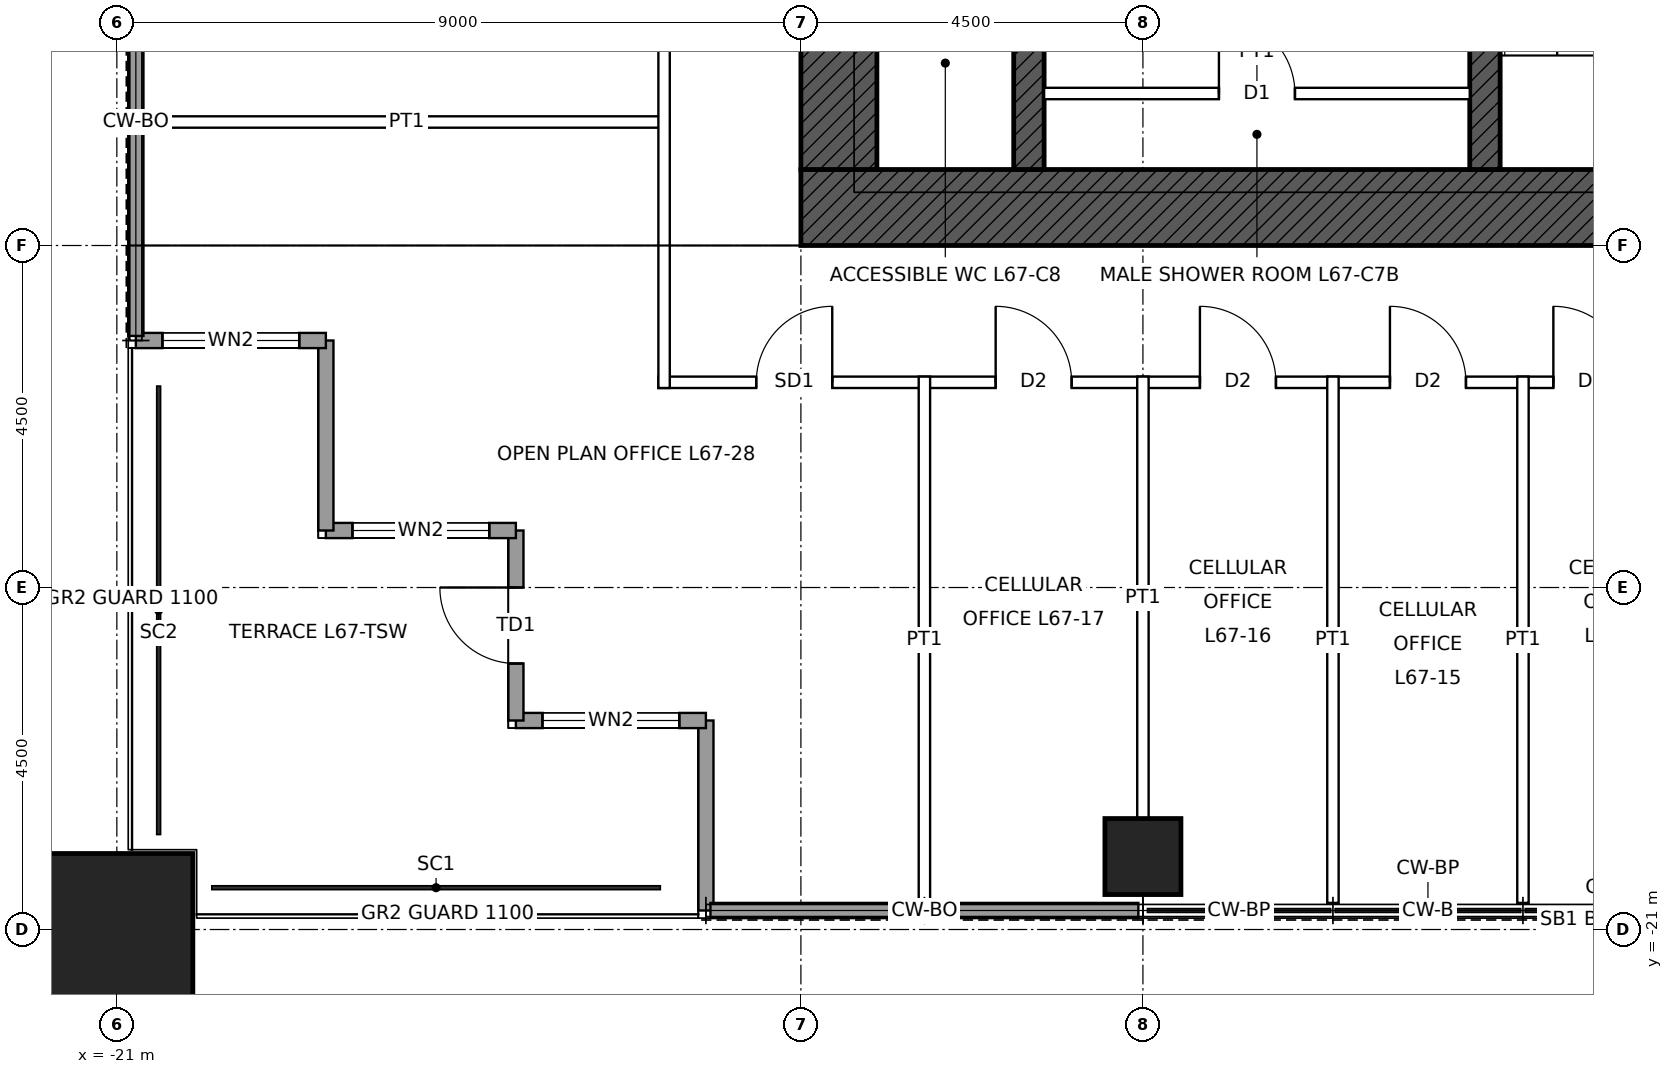
"""IFC4 building model, lengths in metres.
Left out: names, types, materials, properties, quantities, classifications, styles, units other than length and angle.
Written with IfcOpenShell. Run it as: python <this file> out.ifc"""

import sys

from ifc_helpers import new_model, si_unit, direction, frame, frame_2d, origin, origin_2d, place, context, subcontext, project, spatial, rectangle, hollow_rectangle, extrude, element, fill, save


model = new_model("IFC4")
c1 = context("Model", 3, precision=1e-05, world=origin(), true_north=direction((0.0, 1.0)))
c2 = subcontext(c1, "Body", "Model", "MODEL_VIEW")
j1 = project(units=[si_unit("LENGTHUNIT", "METRE"), si_unit("PLANEANGLEUNIT", "RADIAN")], contexts=[c1])
p1 = place(None, origin())
s1 = spatial("IfcSite", under=j1, at=p1, CompositionType="ELEMENT")
p2 = place(p1, origin())
s2 = spatial("IfcBuilding", under=s1, at=p2, CompositionType="ELEMENT")
p3 = place(p2, frame((0.0, 0.0, 303.9)))
s3 = spatial("IfcBuildingStorey", under=s2, at=p3, CompositionType="ELEMENT", Elevation=303.9)
p4 = place(p3, frame((-21.0, -21.0, 0.0), z_axis=(0.0, 0.0, 1.0), x_axis=(1.0, 0.0, 0.0)))
e1 = element("IfcColumn", 1, at=p4, inside=s3, PredefinedType="COLUMN", context=c2, shape_type="SweptSolid", body=[
    extrude(hollow_rectangle(XDim=2.0, YDim=2.0, WallThickness=0.095, at=origin_2d()), origin(), (0.0, 0.0, 1.0), 4.0),
])
p5 = place(p3, frame((-7.5, -20.04, 0.0), z_axis=(0.0, 0.0, 1.0), x_axis=(1.0, 0.0, 0.0)))
e2 = element("IfcColumn", 2, at=p5, inside=s3, PredefinedType="COLUMN", context=c2, shape_type="SweptSolid", body=[
    extrude(hollow_rectangle(XDim=1.0, YDim=1.0, WallThickness=0.075, at=origin_2d()), origin(), (0.0, 0.0, 1.0), 4.0),
])
p6 = place(p3, frame((12.0, -11.5, 0.0), z_axis=(0.0, 0.0, 1.0), x_axis=(-1.0, 0.0, 0.0)))
e3 = element("IfcWall", 3, at=p6, inside=s3, PredefinedType="SHEAR", context=c2, shape_type="SweptSolid", body=[
    extrude(rectangle(XDim=24.0, YDim=1.0, at=frame_2d((12.0, 0.0))), origin(), (0.0, 0.0, 1.0), 4.0),
])
p7 = place(p6, frame((11.5, 0.0, 0.0)))
e4 = element("IfcOpeningElement", 4, at=p7, cuts=e3, PredefinedType="OPENING", context=c2, shape_type="SweptSolid", body=[
    extrude(rectangle(XDim=1.0, YDim=2.1, at=frame_2d((0.5, 1.05))), frame((0.0, 0.51, 0.0), z_axis=(0.0, -1.0, 0.0), x_axis=(1.0, 0.0, 0.0)), (0.0, 0.0, 1.0), 1.02),
])
p8 = place(p6, frame((1.0, 0.0, 0.0)))
e5 = element("IfcOpeningElement", 5, at=p8, cuts=e3, PredefinedType="OPENING", context=c2, shape_type="SweptSolid", body=[
    extrude(rectangle(XDim=1.0, YDim=2.4, at=frame_2d((0.5, 1.2))), frame((0.0, 0.51, 0.0), z_axis=(0.0, -1.0, 0.0), x_axis=(1.0, 0.0, 0.0)), (0.0, 0.0, 1.0), 1.02),
])
p9 = place(p3, frame((-11.5, -11.0, 0.0), z_axis=(0.0, 0.0, 1.0), x_axis=(0.0, 1.0, 0.0)))
e6 = element("IfcWall", 6, at=p9, inside=s3, PredefinedType="SHEAR", context=c2, shape_type="SweptSolid", body=[
    extrude(rectangle(XDim=22.0, YDim=1.0, at=frame_2d((11.0, 0.0))), origin(), (0.0, 0.0, 1.0), 4.0),
])
p10 = place(p9, frame((10.5, 0.0, 0.0)))
e7 = element("IfcOpeningElement", 7, at=p10, cuts=e6, PredefinedType="OPENING", context=c2, shape_type="SweptSolid", body=[
    extrude(rectangle(XDim=1.0, YDim=2.4, at=frame_2d((0.5, 1.2))), frame((0.0, 0.51, 0.0), z_axis=(0.0, -1.0, 0.0), x_axis=(1.0, 0.0, 0.0)), (0.0, 0.0, 1.0), 1.02),
])
p11 = place(p3, frame((-9.0, -11.0, 0.0), z_axis=(0.0, 0.0, 1.0), x_axis=(0.0, 1.0, 0.0)))
e8 = element("IfcWall", 8, at=p11, inside=s3, PredefinedType="SHEAR", context=c2, shape_type="SweptSolid", body=[
    extrude(rectangle(XDim=6.5, YDim=0.4, at=frame_2d((3.25, 0.0))), origin(), (0.0, 0.0, 1.0), 4.0),
])
p12 = place(p11, frame((4.25, 0.0, 0.0)))
e9 = element("IfcOpeningElement", 9, at=p12, cuts=e8, PredefinedType="OPENING", context=c2, shape_type="SweptSolid", body=[
    extrude(rectangle(XDim=1.0, YDim=2.1, at=frame_2d((0.5, 1.05))), frame((0.0, 0.21, 0.0), z_axis=(0.0, -1.0, 0.0), x_axis=(1.0, 0.0, 0.0)), (0.0, 0.0, 1.0), 0.42),
])
p13 = place(p3, frame((-3.0, -11.0, 0.0), z_axis=(0.0, 0.0, 1.0), x_axis=(0.0, 1.0, 0.0)))
e10 = element("IfcWall", 10, at=p13, inside=s3, PredefinedType="SHEAR", context=c2, shape_type="SweptSolid", body=[
    extrude(rectangle(XDim=6.5, YDim=0.4, at=frame_2d((3.25, 0.0))), origin(), (0.0, 0.0, 1.0), 4.0),
])
p14 = place(p3, frame((-13.25, -20.75, 0.0), z_axis=(0.0, 0.0, 1.0), x_axis=(0.0, 1.0, 0.0)))
e11 = element("IfcWall", 11, at=p14, inside=s3, PredefinedType="SOLIDWALL", context=c2, shape_type="SweptSolid", body=[
    extrude(rectangle(XDim=2.5, YDim=0.2, at=frame_2d((1.25, 0.0))), origin(), (0.0, 0.0, 1.0), 3.85),
])
p15 = place(p3, frame((-13.25, -18.25, 0.0), z_axis=(0.0, 0.0, 1.0), x_axis=(-1.0, 0.0, 0.0)))
e12 = element("IfcWall", 12, at=p15, inside=s3, PredefinedType="SOLIDWALL", context=c2, shape_type="SweptSolid", body=[
    extrude(rectangle(XDim=2.5, YDim=0.2, at=frame_2d((1.25, 0.0))), origin(), (0.0, 0.0, 1.0), 3.85),
])
p16 = place(p15, frame((0.35, 0.0, 0.3)))
e13 = element("IfcOpeningElement", 13, at=p16, cuts=e12, PredefinedType="OPENING", context=c2, shape_type="SweptSolid", body=[
    extrude(rectangle(XDim=1.8, YDim=2.4, at=frame_2d((0.9, 1.2))), frame((0.0, 0.11, 0.0), z_axis=(0.0, -1.0, 0.0), x_axis=(1.0, 0.0, 0.0)), (0.0, 0.0, 1.0), 0.22),
])
p17 = place(p3, frame((-15.75, -18.25, 0.0), z_axis=(0.0, 0.0, 1.0), x_axis=(0.0, 1.0, 0.0)))
e14 = element("IfcWall", 14, at=p17, inside=s3, PredefinedType="SOLIDWALL", context=c2, shape_type="SweptSolid", body=[
    extrude(rectangle(XDim=2.5, YDim=0.2, at=frame_2d((1.25, 0.0))), origin(), (0.0, 0.0, 1.0), 3.317),
])
p18 = place(p17, frame((0.75, 0.0, 0.0)))
e15 = element("IfcOpeningElement", 15, at=p18, cuts=e14, PredefinedType="OPENING", context=c2, shape_type="SweptSolid", body=[
    extrude(rectangle(XDim=1.0, YDim=2.4, at=frame_2d((0.5, 1.2))), frame((0.0, 0.11, 0.0), z_axis=(0.0, -1.0, 0.0), x_axis=(1.0, 0.0, 0.0)), (0.0, 0.0, 1.0), 0.22),
])
p19 = place(p3, frame((-15.75, -15.75, 0.0), z_axis=(0.0, 0.0, 1.0), x_axis=(-1.0, 0.0, 0.0)))
e16 = element("IfcWall", 16, at=p19, inside=s3, PredefinedType="SOLIDWALL", context=c2, shape_type="SweptSolid", body=[
    extrude(rectangle(XDim=2.5, YDim=0.2, at=frame_2d((1.25, 0.0))), origin(), (0.0, 0.0, 1.0), 3.85),
])
p20 = place(p19, frame((0.35, 0.0, 0.3)))
e17 = element("IfcOpeningElement", 17, at=p20, cuts=e16, PredefinedType="OPENING", context=c2, shape_type="SweptSolid", body=[
    extrude(rectangle(XDim=1.8, YDim=2.4, at=frame_2d((0.9, 1.2))), frame((0.0, 0.11, 0.0), z_axis=(0.0, -1.0, 0.0), x_axis=(1.0, 0.0, 0.0)), (0.0, 0.0, 1.0), 0.22),
])
p21 = place(p3, frame((-18.25, -15.75, 0.0), z_axis=(0.0, 0.0, 1.0), x_axis=(0.0, 1.0, 0.0)))
e18 = element("IfcWall", 18, at=p21, inside=s3, PredefinedType="SOLIDWALL", context=c2, shape_type="SweptSolid", body=[
    extrude(rectangle(XDim=2.5, YDim=0.2, at=frame_2d((1.25, 0.0))), origin(), (0.0, 0.0, 1.0), 3.85),
])
p22 = place(p3, frame((-18.25, -13.25, 0.0), z_axis=(0.0, 0.0, 1.0), x_axis=(-1.0, 0.0, 0.0)))
e19 = element("IfcWall", 19, at=p22, inside=s3, PredefinedType="SOLIDWALL", context=c2, shape_type="SweptSolid", body=[
    extrude(rectangle(XDim=2.5, YDim=0.2, at=frame_2d((1.25, 0.0))), origin(), (0.0, 0.0, 1.0), 3.85),
])
p23 = place(p22, frame((0.35, 0.0, 0.3)))
e20 = element("IfcOpeningElement", 20, at=p23, cuts=e19, PredefinedType="OPENING", context=c2, shape_type="SweptSolid", body=[
    extrude(rectangle(XDim=1.8, YDim=2.4, at=frame_2d((0.9, 1.2))), frame((0.0, 0.11, 0.0), z_axis=(0.0, -1.0, 0.0), x_axis=(1.0, 0.0, 0.0)), (0.0, 0.0, 1.0), 0.22),
])
for number, where, z_axis, x_axis in (
    (21, (-7.56, -20.75, 0.0), (0.0, 0.0, 1.0), (-1.0, 0.0, 0.0)),
    (22, (-10.405, -20.75, 0.0), (0.0, 0.0, 1.0), (-1.0, 0.0, 0.0)),
    (23, (-20.75, -13.19, 0.0), (0.0, 0.0, 1.0), (0.0, 1.0, 0.0)),
    (24, (-20.75, -10.345, 0.0), (0.0, 0.0, 1.0), (0.0, 1.0, 0.0)),
):
    element("IfcWall", number, at=place(p3, frame(where, z_axis=z_axis, x_axis=x_axis)), inside=s3, PredefinedType="SOLIDWALL", context=c2, shape_type="SweptSolid", body=[
        extrude(rectangle(XDim=2.785, YDim=0.2, at=frame_2d((1.393, 0.0))), origin(), (0.0, 0.0, 1.0), 3.85),
    ])
p24 = place(p3, frame((-13.875, -13.8, 0.0), z_axis=(0.0, 0.0, 1.0), x_axis=(1.0, 0.0, 0.0)))
e25 = element("IfcWall", 25, at=p24, inside=s3, PredefinedType="PARTITIONING", context=c2, shape_type="SweptSolid", body=[
    extrude(rectangle(XDim=27.75, YDim=0.15, at=frame_2d((13.875, 0.0))), origin(), (0.0, 0.0, 1.0), 3.85),
])
p25 = place(p24, frame((21.775, 0.0, 0.0)))
e26 = element("IfcOpeningElement", 26, at=p25, cuts=e25, PredefinedType="OPENING", context=c2, shape_type="SweptSolid", body=[
    extrude(rectangle(XDim=1.0, YDim=2.1, at=frame_2d((0.5, 1.05))), frame((0.0, 0.085, 0.0), z_axis=(0.0, -1.0, 0.0), x_axis=(1.0, 0.0, 0.0)), (0.0, 0.0, 1.0), 0.17),
])
p26 = place(p24, frame((19.625, 0.0, 0.0)))
e27 = element("IfcOpeningElement", 27, at=p26, cuts=e25, PredefinedType="OPENING", context=c2, shape_type="SweptSolid", body=[
    extrude(rectangle(XDim=1.0, YDim=2.1, at=frame_2d((0.5, 1.05))), frame((0.0, 0.085, 0.0), z_axis=(0.0, -1.0, 0.0), x_axis=(1.0, 0.0, 0.0)), (0.0, 0.0, 1.0), 0.17),
])
p27 = place(p24, frame((17.125, 0.0, 0.0)))
e28 = element("IfcOpeningElement", 28, at=p27, cuts=e25, PredefinedType="OPENING", context=c2, shape_type="SweptSolid", body=[
    extrude(rectangle(XDim=1.0, YDim=2.1, at=frame_2d((0.5, 1.05))), frame((0.0, 0.085, 0.0), z_axis=(0.0, -1.0, 0.0), x_axis=(1.0, 0.0, 0.0)), (0.0, 0.0, 1.0), 0.17),
])
p28 = place(p24, frame((14.975, 0.0, 0.0)))
e29 = element("IfcOpeningElement", 29, at=p28, cuts=e25, PredefinedType="OPENING", context=c2, shape_type="SweptSolid", body=[
    extrude(rectangle(XDim=1.0, YDim=2.1, at=frame_2d((0.5, 1.05))), frame((0.0, 0.085, 0.0), z_axis=(0.0, -1.0, 0.0), x_axis=(1.0, 0.0, 0.0)), (0.0, 0.0, 1.0), 0.17),
])
p29 = place(p24, frame((11.775, 0.0, 0.0)))
e30 = element("IfcOpeningElement", 30, at=p29, cuts=e25, PredefinedType="OPENING", context=c2, shape_type="SweptSolid", body=[
    extrude(rectangle(XDim=1.0, YDim=2.1, at=frame_2d((0.5, 1.05))), frame((0.0, 0.085, 0.0), z_axis=(0.0, -1.0, 0.0), x_axis=(1.0, 0.0, 0.0)), (0.0, 0.0, 1.0), 0.17),
])
p30 = place(p24, frame((9.625, 0.0, 0.0)))
e31 = element("IfcOpeningElement", 31, at=p30, cuts=e25, PredefinedType="OPENING", context=c2, shape_type="SweptSolid", body=[
    extrude(rectangle(XDim=1.0, YDim=2.1, at=frame_2d((0.5, 1.05))), frame((0.0, 0.085, 0.0), z_axis=(0.0, -1.0, 0.0), x_axis=(1.0, 0.0, 0.0)), (0.0, 0.0, 1.0), 0.17),
])
p31 = place(p24, frame((7.125, 0.0, 0.0)))
e32 = element("IfcOpeningElement", 32, at=p31, cuts=e25, PredefinedType="OPENING", context=c2, shape_type="SweptSolid", body=[
    extrude(rectangle(XDim=1.0, YDim=2.1, at=frame_2d((0.5, 1.05))), frame((0.0, 0.085, 0.0), z_axis=(0.0, -1.0, 0.0), x_axis=(1.0, 0.0, 0.0)), (0.0, 0.0, 1.0), 0.17),
])
p32 = place(p24, frame((4.438, 0.0, 0.0)))
e33 = element("IfcOpeningElement", 33, at=p32, cuts=e25, PredefinedType="OPENING", context=c2, shape_type="SweptSolid", body=[
    extrude(rectangle(XDim=1.0, YDim=2.1, at=frame_2d((0.5, 1.05))), frame((0.0, 0.085, 0.0), z_axis=(0.0, -1.0, 0.0), x_axis=(1.0, 0.0, 0.0)), (0.0, 0.0, 1.0), 0.17),
])
p33 = place(p24, frame((25.625, 0.0, 0.0)))
e34 = element("IfcOpeningElement", 34, at=p33, cuts=e25, PredefinedType="OPENING", context=c2, shape_type="SweptSolid", body=[
    extrude(rectangle(XDim=1.0, YDim=2.4, at=frame_2d((0.5, 1.2))), frame((0.0, 0.085, 0.0), z_axis=(0.0, -1.0, 0.0), x_axis=(1.0, 0.0, 0.0)), (0.0, 0.0, 1.0), 0.17),
])
p34 = place(p24, frame((1.288, 0.0, 0.0)))
e35 = element("IfcOpeningElement", 35, at=p34, cuts=e25, PredefinedType="OPENING", context=c2, shape_type="SweptSolid", body=[
    extrude(rectangle(XDim=1.0, YDim=2.4, at=frame_2d((0.5, 1.2))), frame((0.0, 0.085, 0.0), z_axis=(0.0, -1.0, 0.0), x_axis=(1.0, 0.0, 0.0)), (0.0, 0.0, 1.0), 0.17),
])
p35 = place(p3, frame((-20.65, -10.375, 0.0), z_axis=(0.0, 0.0, 1.0), x_axis=(1.0, 0.0, 0.0)))
e36 = element("IfcWall", 36, at=p35, inside=s3, PredefinedType="PARTITIONING", context=c2, shape_type="SweptSolid", body=[
    extrude(rectangle(XDim=6.925, YDim=0.15, at=frame_2d((3.462, 0.0))), origin(), (0.0, 0.0, 1.0), 3.85),
])
p36 = place(p3, frame((-13.8, -13.875, 0.0), z_axis=(0.0, 0.0, 1.0), x_axis=(0.0, 1.0, 0.0)))
e37 = element("IfcWall", 37, at=p36, inside=s3, PredefinedType="PARTITIONING", context=c2, shape_type="SweptSolid", body=[
    extrude(rectangle(XDim=11.45, YDim=0.15, at=frame_2d((5.725, 0.0))), origin(), (0.0, 0.0, 1.0), 3.85),
])
p37 = place(p36, frame((4.438, 0.0, 0.0)))
e38 = element("IfcOpeningElement", 38, at=p37, cuts=e37, PredefinedType="OPENING", context=c2, shape_type="SweptSolid", body=[
    extrude(rectangle(XDim=1.0, YDim=2.1, at=frame_2d((0.5, 1.05))), frame((0.0, 0.085, 0.0), z_axis=(0.0, -1.0, 0.0), x_axis=(1.0, 0.0, 0.0)), (0.0, 0.0, 1.0), 0.17),
])
p38 = place(p36, frame((7.125, 0.0, 0.0)))
e39 = element("IfcOpeningElement", 39, at=p38, cuts=e37, PredefinedType="OPENING", context=c2, shape_type="SweptSolid", body=[
    extrude(rectangle(XDim=1.0, YDim=2.1, at=frame_2d((0.5, 1.05))), frame((0.0, 0.085, 0.0), z_axis=(0.0, -1.0, 0.0), x_axis=(1.0, 0.0, 0.0)), (0.0, 0.0, 1.0), 0.17),
])
p39 = place(p36, frame((9.625, 0.0, 0.0)))
e40 = element("IfcOpeningElement", 40, at=p39, cuts=e37, PredefinedType="OPENING", context=c2, shape_type="SweptSolid", body=[
    extrude(rectangle(XDim=1.0, YDim=2.1, at=frame_2d((0.5, 1.05))), frame((0.0, 0.085, 0.0), z_axis=(0.0, -1.0, 0.0), x_axis=(1.0, 0.0, 0.0)), (0.0, 0.0, 1.0), 0.17),
])
p40 = place(p3, frame((-10.375, -20.65, 0.0), z_axis=(0.0, 0.0, 1.0), x_axis=(0.0, 1.0, 0.0)))
e41 = element("IfcWall", 41, at=p40, inside=s3, PredefinedType="PARTITIONING", context=c2, shape_type="SweptSolid", body=[
    extrude(rectangle(XDim=6.925, YDim=0.15, at=frame_2d((3.462, 0.0))), origin(), (0.0, 0.0, 1.0), 3.85),
])
p41 = place(p3, frame((-7.5, -19.54, 0.0), z_axis=(0.0, 0.0, 1.0), x_axis=(0.0, 1.0, 0.0)))
e42 = element("IfcWall", 42, at=p41, inside=s3, PredefinedType="PARTITIONING", context=c2, shape_type="SweptSolid", body=[
    extrude(rectangle(XDim=5.815, YDim=0.15, at=frame_2d((2.907, 0.0))), origin(), (0.0, 0.0, 1.0), 3.243),
])
for number, where, z_axis, x_axis in (
    (43, (-5.0, -20.65, 0.0), (0.0, 0.0, 1.0), (0.0, 1.0, 0.0)),
    (44, (-2.5, -20.65, 0.0), (0.0, 0.0, 1.0), (0.0, 1.0, 0.0)),
):
    element("IfcWall", number, at=place(p3, frame(where, z_axis=z_axis, x_axis=x_axis)), inside=s3, PredefinedType="PARTITIONING", context=c2, shape_type="SweptSolid", body=[
        extrude(rectangle(XDim=6.925, YDim=0.15, at=frame_2d((3.462, 0.0))), origin(), (0.0, 0.0, 1.0), 3.85),
    ])
p42 = place(p3, frame((-8.8, -10.0, 0.0), z_axis=(0.0, 0.0, 1.0), x_axis=(1.0, 0.0, 0.0)))
e45 = element("IfcWall", 45, at=p42, inside=s3, PredefinedType="PARTITIONING", context=c2, shape_type="SweptSolid", body=[
    extrude(rectangle(XDim=5.6, YDim=0.15, at=frame_2d((2.8, 0.0))), origin(), (0.0, 0.0, 1.0), 3.75),
])
p43 = place(p42, frame((2.3, 0.0, 0.0)))
e46 = element("IfcOpeningElement", 46, at=p43, cuts=e45, PredefinedType="OPENING", context=c2, shape_type="SweptSolid", body=[
    extrude(rectangle(XDim=1.0, YDim=2.1, at=frame_2d((0.5, 1.05))), frame((0.0, 0.085, 0.0), z_axis=(0.0, -1.0, 0.0), x_axis=(1.0, 0.0, 0.0)), (0.0, 0.0, 1.0), 0.17),
])
p44 = place(p16, origin())
e47 = element("IfcWindow", 47, at=p44, inside=s3, PartitioningType="SINGLE_PANEL", PredefinedType="WINDOW", context=c2, shape_type="SweptSolid", body=[
    extrude(rectangle(XDim=1.8, YDim=2.4, at=frame_2d((0.9, 1.2))), frame((0.0, 0.03, 0.0), z_axis=(0.0, -1.0, 0.0), x_axis=(1.0, 0.0, 0.0)), (0.0, 0.0, 1.0), 0.06),
])
fill(e13, e47)
p45 = place(p18, origin())
e48 = element("IfcDoor", 48, at=p45, inside=s3, OperationType="SINGLE_SWING_RIGHT", PredefinedType="DOOR", context=c2, shape_type="SweptSolid", body=[
    extrude(rectangle(XDim=1.0, YDim=2.4, at=frame_2d((0.5, 1.2))), frame((0.0, 0.025, 0.0), z_axis=(0.0, -1.0, 0.0), x_axis=(1.0, 0.0, 0.0)), (0.0, 0.0, 1.0), 0.05),
])
fill(e15, e48)
p46 = place(p20, origin())
e49 = element("IfcWindow", 49, at=p46, inside=s3, PartitioningType="SINGLE_PANEL", PredefinedType="WINDOW", context=c2, shape_type="SweptSolid", body=[
    extrude(rectangle(XDim=1.8, YDim=2.4, at=frame_2d((0.9, 1.2))), frame((0.0, 0.03, 0.0), z_axis=(0.0, -1.0, 0.0), x_axis=(1.0, 0.0, 0.0)), (0.0, 0.0, 1.0), 0.06),
])
fill(e17, e49)
p47 = place(p23, origin())
e50 = element("IfcWindow", 50, at=p47, inside=s3, PartitioningType="SINGLE_PANEL", PredefinedType="WINDOW", context=c2, shape_type="SweptSolid", body=[
    extrude(rectangle(XDim=1.8, YDim=2.4, at=frame_2d((0.9, 1.2))), frame((0.0, 0.03, 0.0), z_axis=(0.0, -1.0, 0.0), x_axis=(1.0, 0.0, 0.0)), (0.0, 0.0, 1.0), 0.06),
])
fill(e20, e50)
p48 = place(p43, origin())
e51 = element("IfcDoor", 51, at=p48, inside=s3, OperationType="SINGLE_SWING_LEFT", PredefinedType="DOOR", context=c2, shape_type="SweptSolid", body=[
    extrude(rectangle(XDim=1.0, YDim=2.1, at=frame_2d((0.5, 1.05))), frame((0.0, 0.025, 0.0), z_axis=(0.0, -1.0, 0.0), x_axis=(1.0, 0.0, 0.0)), (0.0, 0.0, 1.0), 0.05),
])
fill(e46, e51)
p49 = place(p29, origin())
e52 = element("IfcDoor", 52, at=p49, inside=s3, OperationType="SINGLE_SWING_LEFT", PredefinedType="DOOR", context=c2, shape_type="SweptSolid", body=[
    extrude(rectangle(XDim=1.0, YDim=2.1, at=frame_2d((0.5, 1.05))), frame((0.0, 0.025, 0.0), z_axis=(0.0, -1.0, 0.0), x_axis=(1.0, 0.0, 0.0)), (0.0, 0.0, 1.0), 0.05),
])
fill(e30, e52)
p50 = place(p30, origin())
e53 = element("IfcDoor", 53, at=p50, inside=s3, OperationType="SINGLE_SWING_LEFT", PredefinedType="DOOR", context=c2, shape_type="SweptSolid", body=[
    extrude(rectangle(XDim=1.0, YDim=2.1, at=frame_2d((0.5, 1.05))), frame((0.0, 0.025, 0.0), z_axis=(0.0, -1.0, 0.0), x_axis=(1.0, 0.0, 0.0)), (0.0, 0.0, 1.0), 0.05),
])
fill(e31, e53)
p51 = place(p31, origin())
e54 = element("IfcDoor", 54, at=p51, inside=s3, OperationType="SINGLE_SWING_LEFT", PredefinedType="DOOR", context=c2, shape_type="SweptSolid", body=[
    extrude(rectangle(XDim=1.0, YDim=2.1, at=frame_2d((0.5, 1.05))), frame((0.0, 0.025, 0.0), z_axis=(0.0, -1.0, 0.0), x_axis=(1.0, 0.0, 0.0)), (0.0, 0.0, 1.0), 0.05),
])
fill(e32, e54)
p52 = place(p32, origin())
e55 = element("IfcDoor", 55, at=p52, inside=s3, OperationType="SINGLE_SWING_LEFT", PredefinedType="DOOR", context=c2, shape_type="SweptSolid", body=[
    extrude(rectangle(XDim=1.0, YDim=2.1, at=frame_2d((0.5, 1.05))), frame((0.0, 0.025, 0.0), z_axis=(0.0, -1.0, 0.0), x_axis=(1.0, 0.0, 0.0)), (0.0, 0.0, 1.0), 0.05),
])
fill(e33, e55)
p53 = place(p34, origin())
e56 = element("IfcDoor", 56, at=p53, inside=s3, OperationType="SINGLE_SWING_RIGHT", PredefinedType="DOOR", context=c2, shape_type="SweptSolid", body=[
    extrude(rectangle(XDim=1.0, YDim=2.4, at=frame_2d((0.5, 1.2))), frame((0.0, 0.025, 0.0), z_axis=(0.0, -1.0, 0.0), x_axis=(1.0, 0.0, 0.0)), (0.0, 0.0, 1.0), 0.05),
])
fill(e35, e56)
save(model, sys.argv[1])
